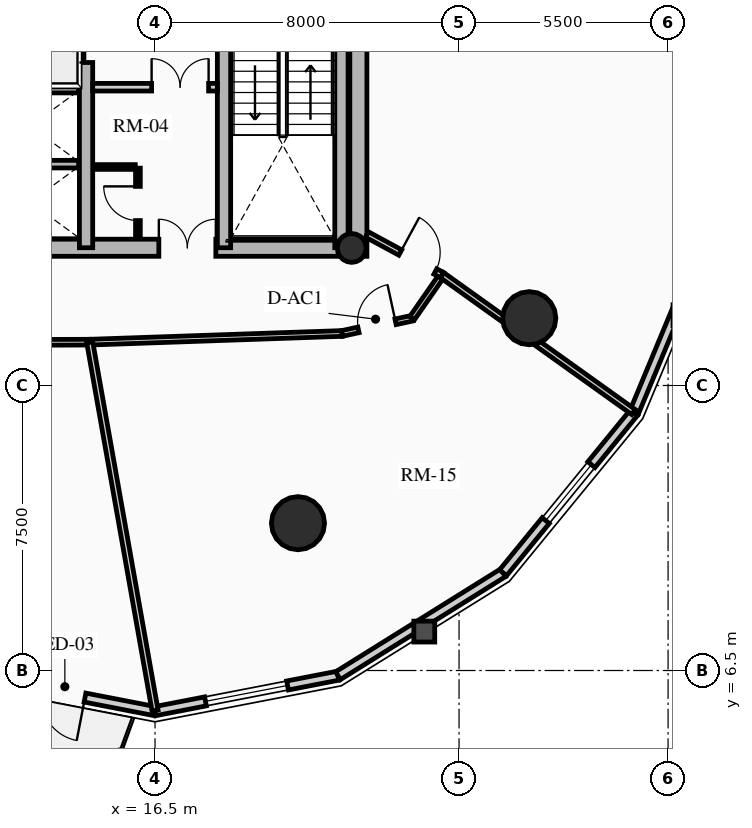
"""IFC4 building model, lengths in metres.
Left out: names, types, materials, properties, quantities, classifications, styles, units other than length and angle.
Written with IfcOpenShell. Run it as: python <this file> out.ifc"""

import sys

from ifc_helpers import new_model, si_unit, direction, frame, frame_2d, origin, origin_2d, place, context, subcontext, project, spatial, rectangle, circle, hollow_circle, extrude, source, transform, mapped, element, fill, save


model = new_model("IFC4")
c1 = context("Model", 3, precision=1e-05, world=origin(), true_north=direction((0.0, 1.0)))
c2 = subcontext(c1, "Body", "Model", "MODEL_VIEW")
j1 = project(units=[si_unit("LENGTHUNIT", "METRE"), si_unit("PLANEANGLEUNIT", "RADIAN")], contexts=[c1])
p1 = place(None, origin())
s1 = spatial("IfcSite", under=j1, at=p1, CompositionType="ELEMENT")
p2 = place(p1, origin())
s2 = spatial("IfcBuilding", under=s1, at=p2, CompositionType="ELEMENT")
p3 = place(p2, frame((0.0, 0.0, 113.8)))
s3 = spatial("IfcBuildingStorey", under=s2, at=p3, CompositionType="ELEMENT", Elevation=113.8)
p4 = place(p3, frame((21.85, 17.4, 0.0), z_axis=(0.0, 0.0, 1.0), x_axis=(0.0, 1.0, 0.0)))
e1 = element("IfcWall", 1, at=p4, inside=s3, PredefinedType="SHEAR", context=c2, shape_type="SweptSolid", body=[
    extrude(rectangle(XDim=14.2, YDim=0.45, at=frame_2d((7.1, 0.0))), origin(), (0.0, 0.0, 1.0), 2.91),
])
p5 = place(p3, frame((11.15, 17.625, 0.0), z_axis=(0.0, 0.0, 1.0), x_axis=(1.0, 0.0, 0.0)))
e2 = element("IfcWall", 2, at=p5, inside=s3, PredefinedType="SHEAR", context=c2, shape_type="SweptSolid", body=[
    extrude(rectangle(XDim=10.7, YDim=0.45, at=frame_2d((5.35, 0.0))), origin(), (0.0, 0.0, 1.0), 2.91),
])
m1 = source(origin(), c2, "Body", "SweptSolid", [
    extrude(rectangle(XDim=1.5, YDim=2.02, at=frame_2d((0.75, 1.01))), frame((0.0, 0.235, 0.0), z_axis=(0.0, -1.0, 0.0), x_axis=(1.0, 0.0, 0.0)), (0.0, 0.0, 1.0), 0.47),
])
p6 = place(p5, frame((5.45, 0.0, 0.0)))
e3 = element("IfcOpeningElement", 3, at=p6, cuts=e2, PredefinedType="OPENING", context=c2, shape_type="MappedRepresentation", body=[
    mapped(m1, transform((0.0, 0.0, 0.0), x_axis=(1.0, 0.0, 0.0), y_axis=(0.0, 1.0, 0.0), z_axis=(0.0, 0.0, 1.0), scale=1.0)),
])
p7 = place(p3, frame((14.685, 17.625, 0.0), z_axis=(0.0, 0.0, 1.0), x_axis=(0.0, 1.0, 0.0)))
e4 = element("IfcWall", 4, at=p7, inside=s3, PredefinedType="SHEAR", context=c2, shape_type="SweptSolid", body=[
    extrude(rectangle(XDim=13.75, YDim=0.35, at=frame_2d((6.875, 0.0))), origin(), (0.0, 0.0, 1.0), 2.91),
])
m2 = source(origin(), c2, "Body", "SweptSolid", [
    extrude(rectangle(XDim=1.1, YDim=2.015, at=frame_2d((0.55, 1.007))), frame((0.0, 0.185, 0.0), z_axis=(0.0, -1.0, 0.0), x_axis=(1.0, 0.0, 0.0)), (0.0, 0.0, 1.0), 0.37),
])
p8 = place(p7, frame((4.875, 0.0, 0.0)))
e5 = element("IfcOpeningElement", 5, at=p8, cuts=e4, PredefinedType="OPENING", context=c2, shape_type="MappedRepresentation", body=[
    mapped(m2, transform((0.0, 0.0, 0.0), x_axis=(1.0, 0.0, 0.0), y_axis=(0.0, 1.0, 0.0), z_axis=(0.0, 0.0, 1.0), scale=1.0)),
])
m3 = source(origin(), c2, "Body", "SweptSolid", [
    extrude(rectangle(XDim=1.15, YDim=2.02, at=frame_2d((0.575, 1.01))), frame((0.0, 0.185, 0.0), z_axis=(0.0, -1.0, 0.0), x_axis=(1.0, 0.0, 0.0)), (0.0, 0.0, 1.0), 0.37),
])
p9 = place(p7, frame((7.295, 0.0, 0.0)))
e6 = element("IfcOpeningElement", 6, at=p9, cuts=e4, PredefinedType="OPENING", context=c2, shape_type="MappedRepresentation", body=[
    mapped(m3, transform((0.0, 0.0, 0.0), x_axis=(1.0, 0.0, 0.0), y_axis=(0.0, 1.0, 0.0), z_axis=(0.0, 0.0, 1.0), scale=1.0)),
])
p10 = place(p3, frame((18.315, 17.625, 0.0), z_axis=(0.0, 0.0, 1.0), x_axis=(0.0, 1.0, 0.0)))
e7 = element("IfcWall", 7, at=p10, inside=s3, PredefinedType="SHEAR", context=c2, shape_type="SweptSolid", body=[
    extrude(rectangle(XDim=13.75, YDim=0.35, at=frame_2d((6.875, 0.0))), origin(), (0.0, 0.0, 1.0), 2.91),
])
p11 = place(p10, frame((10.0, 0.0, 0.0)))
e8 = element("IfcOpeningElement", 8, at=p11, cuts=e7, PredefinedType="OPENING", context=c2, shape_type="MappedRepresentation", body=[
    mapped(m2, transform((0.0, 0.0, 0.0), x_axis=(1.0, 0.0, 0.0), y_axis=(0.0, 1.0, 0.0), z_axis=(0.0, 0.0, 1.0), scale=1.0)),
])
p12 = place(p10, frame((12.0, 0.0, 0.0)))
e9 = element("IfcOpeningElement", 9, at=p12, cuts=e7, PredefinedType="OPENING", context=c2, shape_type="MappedRepresentation", body=[
    mapped(m2, transform((0.0, 0.0, 0.0), x_axis=(1.0, 0.0, 0.0), y_axis=(0.0, 1.0, 0.0), z_axis=(0.0, 0.0, 1.0), scale=1.0)),
])
p13 = place(p10, frame((5.305, 0.0, 0.0)))
e10 = element("IfcOpeningElement", 10, at=p13, cuts=e7, PredefinedType="OPENING", context=c2, shape_type="MappedRepresentation", body=[
    mapped(m3, transform((0.0, 0.0, 0.0), x_axis=(1.0, 0.0, 0.0), y_axis=(0.0, 1.0, 0.0), z_axis=(0.0, 0.0, 1.0), scale=1.0)),
])
p14 = place(p3, frame((21.405, 17.625, 0.0), z_axis=(0.0, 0.0, 1.0), x_axis=(0.0, 1.0, 0.0)))
e11 = element("IfcWall", 11, at=p14, inside=s3, PredefinedType="SHEAR", context=c2, shape_type="SweptSolid", body=[
    extrude(rectangle(XDim=6.72, YDim=0.35, at=frame_2d((3.36, 0.0))), origin(), (0.0, 0.0, 1.0), 2.91),
])
p15 = place(p3, frame((21.675, 17.62, 0.0), z_axis=(0.0, 0.0, 1.0), x_axis=(1.0, 0.0, 0.0)))
e12 = element("IfcColumn", 12, at=p15, inside=s3, PredefinedType="COLUMN", context=c2, shape_type="SweptSolid", body=[
    extrude(hollow_circle(Radius=0.38, WallThickness=0.032, at=origin_2d()), origin(), (0.0, 0.0, 1.0), 2.91),
])
for number, where, z_axis, x_axis in (
    (13, (20.261, 10.377, 0.0), (0.0, 0.0, 1.0), (1.0, 0.0, 0.0)),
    (14, (26.347, 15.771, 0.0), (0.0, 0.0, 1.0), (1.0, 0.0, 0.0)),
):
    element("IfcColumn", number, at=place(p3, frame(where, z_axis=z_axis, x_axis=x_axis)), inside=s3, PredefinedType="USERDEFINED", context=c2, shape_type="SweptSolid", body=[
        extrude(circle(Radius=0.7, at=origin_2d()), origin(), (0.0, 0.0, 1.0), 2.91),
    ])
p16 = place(p3, frame((16.5, 5.43, 0.0), z_axis=(0.0, 0.0, 1.0), x_axis=(-0.981723785992, 0.190311344954, 0.0)))
e15 = element("IfcWall", 15, at=p16, inside=s3, PredefinedType="SOLIDWALL", context=c2, shape_type="SweptSolid", body=[
    extrude(rectangle(XDim=4.904, YDim=0.24, at=frame_2d((2.452, 0.0))), origin(), (0.0, 0.0, 1.0), 2.179),
])
m4 = source(origin(), c2, "Body", "SweptSolid", [
    extrude(rectangle(XDim=1.15, YDim=2.005, at=frame_2d((0.575, 1.002))), frame((0.0, 0.13, 0.0), z_axis=(0.0, -1.0, 0.0), x_axis=(1.0, 0.0, 0.0)), (0.0, 0.0, 1.0), 0.26),
])
p17 = place(p16, frame((1.877, 0.0, 0.0)))
e16 = element("IfcOpeningElement", 16, at=p17, cuts=e15, PredefinedType="OPENING", context=c2, shape_type="MappedRepresentation", body=[
    mapped(m4, transform((0.0, 0.0, 0.0), x_axis=(1.0, 0.0, 0.0), y_axis=(0.0, 1.0, 0.0), z_axis=(0.0, 0.0, 1.0), scale=1.0)),
])
p18 = place(p3, frame((21.315, 6.363, 0.0), z_axis=(0.0, 0.0, 1.0), x_axis=(-0.981723785992, -0.190311344954, 0.0)))
e17 = element("IfcWall", 17, at=p18, inside=s3, PredefinedType="SOLIDWALL", context=c2, shape_type="SweptSolid", body=[
    extrude(rectangle(XDim=4.904, YDim=0.24, at=frame_2d((2.452, 0.0))), origin(), (0.0, 0.0, 1.0), 2.179),
])
m5 = source(origin(), c2, "Body", "SweptSolid", [
    extrude(rectangle(XDim=2.2, YDim=1.35, at=frame_2d((1.1, 0.675))), frame((0.0, 0.13, 0.0), z_axis=(0.0, -1.0, 0.0), x_axis=(1.0, 0.0, 0.0)), (0.0, 0.0, 1.0), 0.26),
])
p19 = place(p18, frame((1.352, 0.0, 0.65)))
e18 = element("IfcOpeningElement", 18, at=p19, cuts=e17, PredefinedType="OPENING", context=c2, shape_type="MappedRepresentation", body=[
    mapped(m5, transform((0.0, 0.0, 0.0), x_axis=(1.0, 0.0, 0.0), y_axis=(0.0, 1.0, 0.0), z_axis=(0.0, 0.0, 1.0), scale=1.0)),
])
p20 = place(p3, frame((25.658, 9.072, 0.0), z_axis=(0.0, 0.0, 1.0), x_axis=(-0.848520380187, -0.529162701263, 0.0)))
e19 = element("IfcWall", 19, at=p20, inside=s3, PredefinedType="SOLIDWALL", context=c2, shape_type="SweptSolid", body=[
    extrude(rectangle(XDim=5.119, YDim=0.24, at=frame_2d((2.56, 0.0))), origin(), (0.0, 0.0, 1.0), 2.179),
])
p21 = place(p3, frame((29.105, 13.291, 0.0), z_axis=(0.0, 0.0, 1.0), x_axis=(-0.632700781152, -0.77439635945, 0.0)))
e20 = element("IfcWall", 20, at=p21, inside=s3, PredefinedType="SOLIDWALL", context=c2, shape_type="SweptSolid", body=[
    extrude(rectangle(XDim=5.448, YDim=0.24, at=frame_2d((2.724, 0.0))), origin(), (0.0, 0.0, 1.0), 2.179),
])
m6 = source(origin(), c2, "Body", "SweptSolid", [
    extrude(rectangle(XDim=1.9, YDim=1.35, at=frame_2d((0.95, 0.675))), frame((0.0, 0.13, 0.0), z_axis=(0.0, -1.0, 0.0), x_axis=(1.0, 0.0, 0.0)), (0.0, 0.0, 1.0), 0.26),
])
p22 = place(p21, frame((1.774, 0.0, 0.65)))
e21 = element("IfcOpeningElement", 21, at=p22, cuts=e20, PredefinedType="OPENING", context=c2, shape_type="MappedRepresentation", body=[
    mapped(m6, transform((0.0, 0.0, 0.0), x_axis=(1.0, 0.0, 0.0), y_axis=(0.0, 1.0, 0.0), z_axis=(0.0, 0.0, 1.0), scale=1.0)),
])
p23 = place(p3, frame((31.318, 18.607, 0.0), z_axis=(0.0, 0.0, 1.0), x_axis=(-0.384344417632, -0.923189779317, 0.0)))
e22 = element("IfcWall", 22, at=p23, inside=s3, PredefinedType="SOLIDWALL", context=c2, shape_type="SweptSolid", body=[
    extrude(rectangle(XDim=5.758, YDim=0.24, at=frame_2d((2.879, 0.0))), origin(), (0.0, 0.0, 1.0), 2.179),
])
for number, where, z_axis, x_axis in (
    (23, (11.52, 21.8, 0.0), (0.0, 0.0, 1.0), (1.0, 0.0, 0.0)),
    (24, (11.52, 19.825, 0.0), (0.0, 0.0, 1.0), (1.0, 0.0, 0.0)),
):
    element("IfcWall", number, at=place(p3, frame(where, z_axis=z_axis, x_axis=x_axis)), inside=s3, PredefinedType="SHEAR", context=c2, shape_type="SweptSolid", body=[
        extrude(rectangle(XDim=2.97, YDim=0.2, at=frame_2d((1.485, 0.0))), origin(), (0.0, 0.0, 1.0), 2.91),
    ])
p24 = place(p3, frame((14.86, 21.85, 0.0), z_axis=(0.0, 0.0, 1.0), x_axis=(1.0, 0.0, 0.0)))
e25 = element("IfcWall", 25, at=p24, inside=s3, PredefinedType="PARTITIONING", context=c2, shape_type="SweptSolid", body=[
    extrude(rectangle(XDim=3.28, YDim=0.2, at=frame_2d((1.64, 0.0))), origin(), (0.0, 0.0, 1.0), 2.655),
])
m7 = source(origin(), c2, "Body", "SweptSolid", [
    extrude(rectangle(XDim=1.5, YDim=2.02, at=frame_2d((0.75, 1.01))), frame((0.0, 0.11, 0.0), z_axis=(0.0, -1.0, 0.0), x_axis=(1.0, 0.0, 0.0)), (0.0, 0.0, 1.0), 0.22),
])
p25 = place(p24, frame((1.55, 0.0, 0.0)))
e26 = element("IfcOpeningElement", 26, at=p25, cuts=e25, PredefinedType="OPENING", context=c2, shape_type="MappedRepresentation", body=[
    mapped(m7, transform((0.0, 0.0, 0.0), x_axis=(1.0, 0.0, 0.0), y_axis=(0.0, 1.0, 0.0), z_axis=(0.0, 0.0, 1.0), scale=1.0)),
])
p26 = place(p3, frame((16.05, 17.92, 0.0), z_axis=(0.0, 0.0, 1.0), x_axis=(0.0, 1.0, 0.0)))
e27 = element("IfcWall", 27, at=p26, inside=s3, PredefinedType="PARTITIONING", context=c2, shape_type="SweptSolid", body=[
    extrude(rectangle(XDim=1.8, YDim=0.125, at=frame_2d((0.9, 0.0))), origin(), (0.0, 0.0, 1.0), 2.655),
])
m8 = source(origin(), c2, "Body", "SweptSolid", [
    extrude(rectangle(XDim=0.9, YDim=2.005, at=frame_2d((0.45, 1.002))), frame((0.0, 0.073, 0.0), z_axis=(0.0, -1.0, 0.0), x_axis=(1.0, 0.0, 0.0)), (0.0, 0.0, 1.0), 0.145),
])
p27 = place(p26, frame((0.42, 0.0, 0.0)))
e28 = element("IfcOpeningElement", 28, at=p27, cuts=e27, PredefinedType="OPENING", context=c2, shape_type="MappedRepresentation", body=[
    mapped(m8, transform((0.0, 0.0, 0.0), x_axis=(1.0, 0.0, 0.0), y_axis=(0.0, 1.0, 0.0), z_axis=(0.0, 0.0, 1.0), scale=1.0)),
])
p28 = place(p3, frame((14.88, 19.75, 0.0), z_axis=(0.0, 0.0, 1.0), x_axis=(1.0, 0.0, 0.0)))
e29 = element("IfcWall", 29, at=p28, inside=s3, PredefinedType="PARTITIONING", context=c2, shape_type="SweptSolid", body=[
    extrude(rectangle(XDim=1.1, YDim=0.125, at=frame_2d((0.55, 0.0))), origin(), (0.0, 0.0, 1.0), 2.655),
])
p29 = place(p3, frame((11.46, 15.129, 0.0), z_axis=(0.0, 0.0, 1.0), x_axis=(0.999993513287, 0.003601858435, 0.0)))
e30 = element("IfcWall", 30, at=p29, inside=s3, PredefinedType="PARTITIONING", context=c2, shape_type="SweptSolid", body=[
    extrude(rectangle(XDim=3.321, YDim=0.15, at=frame_2d((1.661, 0.0))), origin(), (0.0, 0.0, 1.0), 2.225),
])
p30 = place(p3, frame((14.781, 15.141, 0.0), z_axis=(0.0, 0.0, 1.0), x_axis=(0.999407918707, 0.034406569513, 0.0)))
e31 = element("IfcWall", 31, at=p30, inside=s3, PredefinedType="PARTITIONING", context=c2, shape_type="SweptSolid", body=[
    extrude(rectangle(XDim=6.642, YDim=0.15, at=frame_2d((3.321, 0.0))), origin(), (0.0, 0.0, 1.0), 2.225),
])
p31 = place(p3, frame((21.419, 15.369, 0.0), z_axis=(0.0, 0.0, 1.0), x_axis=(0.977192701953, 0.212354475464, 0.0)))
e32 = element("IfcWall", 32, at=p31, inside=s3, PredefinedType="PARTITIONING", context=c2, shape_type="SweptSolid", body=[
    extrude(rectangle(XDim=1.888, YDim=0.15, at=frame_2d((0.944, 0.0))), origin(), (0.0, 0.0, 1.0), 2.225),
])
m9 = source(origin(), c2, "Body", "SweptSolid", [
    extrude(rectangle(XDim=1.0, YDim=2.015, at=frame_2d((0.5, 1.007))), frame((0.0, 0.085, 0.0), z_axis=(0.0, -1.0, 0.0), x_axis=(1.0, 0.0, 0.0)), (0.0, 0.0, 1.0), 0.17),
])
p32 = place(p31, frame((0.444, 0.0, 0.0)))
e33 = element("IfcOpeningElement", 33, at=p32, cuts=e32, PredefinedType="OPENING", context=c2, shape_type="MappedRepresentation", body=[
    mapped(m9, transform((0.0, 0.0, 0.0), x_axis=(1.0, 0.0, 0.0), y_axis=(0.0, 1.0, 0.0), z_axis=(0.0, 0.0, 1.0), scale=1.0)),
])
p33 = place(p3, frame((23.263, 15.77, 0.0), z_axis=(0.0, 0.0, 1.0), x_axis=(0.570743456919, 0.821128434768, 0.0)))
e34 = element("IfcWall", 34, at=p33, inside=s3, PredefinedType="PARTITIONING", context=c2, shape_type="SweptSolid", body=[
    extrude(rectangle(XDim=1.382, YDim=0.15, at=frame_2d((0.691, 0.0))), origin(), (0.0, 0.0, 1.0), 2.225),
])
p34 = place(p3, frame((14.781, 15.141, 0.0), z_axis=(0.0, 0.0, 1.0), x_axis=(0.174659805548, -0.984628839881, 0.0)))
e35 = element("IfcWall", 35, at=p34, inside=s3, PredefinedType="PARTITIONING", context=c2, shape_type="SweptSolid", body=[
    extrude(rectangle(XDim=9.842, YDim=0.16, at=frame_2d((4.921, 0.0))), origin(), (0.0, 0.0, 1.0), 2.179),
])
p35 = place(p3, frame((24.052, 16.905, 0.0), z_axis=(0.0, 0.0, 1.0), x_axis=(0.813437670746, -0.581652091727, 0.0)))
e36 = element("IfcWall", 36, at=p35, inside=s3, PredefinedType="PARTITIONING", context=c2, shape_type="SweptSolid", body=[
    extrude(rectangle(XDim=6.192, YDim=0.16, at=frame_2d((3.096, 0.0))), origin(), (0.0, 0.0, 1.0), 2.179),
])
p36 = place(p3, frame((22.075, 17.975, 0.0), z_axis=(0.0, 0.0, 1.0), x_axis=(0.879356383302, -0.476164206073, 0.0)))
e37 = element("IfcWall", 37, at=p36, inside=s3, PredefinedType="PARTITIONING", context=c2, shape_type="SweptSolid", body=[
    extrude(rectangle(XDim=2.248, YDim=0.16, at=frame_2d((1.124, 0.0))), origin(), (0.0, 0.0, 1.0), 2.225),
])
m10 = source(origin(), c2, "Body", "SweptSolid", [
    extrude(rectangle(XDim=1.05, YDim=2.015, at=frame_2d((0.525, 1.007))), frame((0.0, 0.09, 0.0), z_axis=(0.0, -1.0, 0.0), x_axis=(1.0, 0.0, 0.0)), (0.0, 0.0, 1.0), 0.18),
])
p37 = place(p36, frame((0.998, 0.0, 0.0)))
e38 = element("IfcOpeningElement", 38, at=p37, cuts=e37, PredefinedType="OPENING", context=c2, shape_type="MappedRepresentation", body=[
    mapped(m10, transform((0.0, 0.0, 0.0), x_axis=(1.0, 0.0, 0.0), y_axis=(0.0, 1.0, 0.0), z_axis=(0.0, 0.0, 1.0), scale=1.0)),
])
m11 = source(origin(), c2, "Body", "SweptSolid", [
    extrude(rectangle(XDim=1.15, YDim=2.005, at=frame_2d((0.575, 1.002))), frame((0.0, 0.025, 0.0), z_axis=(0.0, -1.0, 0.0), x_axis=(1.0, 0.0, 0.0)), (0.0, 0.0, 1.0), 0.05),
])
p38 = place(p17, origin())
e39 = element("IfcDoor", 39, at=p38, inside=s3, OperationType="SINGLE_SWING_LEFT", PredefinedType="DOOR", context=c2, shape_type="MappedRepresentation", body=[
    mapped(m11, transform((0.0, 0.0, 0.0), x_axis=(1.0, 0.0, 0.0), y_axis=(0.0, 1.0, 0.0), z_axis=(0.0, 0.0, 1.0), scale=1.0)),
])
fill(e16, e39)
m12 = source(origin(), c2, "Body", "SweptSolid", [
    extrude(rectangle(XDim=2.2, YDim=1.35, at=frame_2d((1.1, 0.675))), frame((0.0, 0.03, 0.0), z_axis=(0.0, -1.0, 0.0), x_axis=(1.0, 0.0, 0.0)), (0.0, 0.0, 1.0), 0.06),
])
p39 = place(p19, origin())
e40 = element("IfcWindow", 40, at=p39, inside=s3, PartitioningType="DOUBLE_PANEL_VERTICAL", PredefinedType="WINDOW", context=c2, shape_type="MappedRepresentation", body=[
    mapped(m12, transform((0.0, 0.0, 0.0), x_axis=(1.0, 0.0, 0.0), y_axis=(0.0, 1.0, 0.0), z_axis=(0.0, 0.0, 1.0), scale=1.0)),
])
fill(e18, e40)
m13 = source(origin(), c2, "Body", "SweptSolid", [
    extrude(rectangle(XDim=1.9, YDim=1.35, at=frame_2d((0.95, 0.675))), frame((0.0, 0.03, 0.0), z_axis=(0.0, -1.0, 0.0), x_axis=(1.0, 0.0, 0.0)), (0.0, 0.0, 1.0), 0.06),
])
p40 = place(p22, origin())
e41 = element("IfcWindow", 41, at=p40, inside=s3, PartitioningType="DOUBLE_PANEL_VERTICAL", PredefinedType="WINDOW", context=c2, shape_type="MappedRepresentation", body=[
    mapped(m13, transform((0.0, 0.0, 0.0), x_axis=(1.0, 0.0, 0.0), y_axis=(0.0, 1.0, 0.0), z_axis=(0.0, 0.0, 1.0), scale=1.0)),
])
fill(e21, e41)
m14 = source(origin(), c2, "Body", "SweptSolid", [
    extrude(rectangle(XDim=1.1, YDim=2.015, at=frame_2d((0.55, 1.007))), frame((0.0, 0.025, 0.0), z_axis=(0.0, -1.0, 0.0), x_axis=(1.0, 0.0, 0.0)), (0.0, 0.0, 1.0), 0.05),
])
p41 = place(p8, origin())
e42 = element("IfcDoor", 42, at=p41, inside=s3, OperationType="SLIDING_TO_LEFT", PredefinedType="DOOR", context=c2, shape_type="MappedRepresentation", body=[
    mapped(m14, transform((0.0, 0.0, 0.0), x_axis=(1.0, 0.0, 0.0), y_axis=(0.0, 1.0, 0.0), z_axis=(0.0, 0.0, 1.0), scale=1.0)),
])
fill(e5, e42)
m15 = source(origin(), c2, "Body", "SweptSolid", [
    extrude(rectangle(XDim=1.5, YDim=2.02, at=frame_2d((0.75, 1.01))), frame((0.0, 0.025, 0.0), z_axis=(0.0, -1.0, 0.0), x_axis=(1.0, 0.0, 0.0)), (0.0, 0.0, 1.0), 0.05),
])
p42 = place(p6, origin())
e43 = element("IfcDoor", 43, at=p42, inside=s3, OperationType="DOUBLE_DOOR_SINGLE_SWING", PredefinedType="DOOR", context=c2, shape_type="MappedRepresentation", body=[
    mapped(m15, transform((0.0, 0.0, 0.0), x_axis=(1.0, 0.0, 0.0), y_axis=(0.0, 1.0, 0.0), z_axis=(0.0, 0.0, 1.0), scale=1.0)),
])
fill(e3, e43)
p43 = place(p25, origin())
e44 = element("IfcDoor", 44, at=p43, inside=s3, OperationType="DOUBLE_DOOR_SINGLE_SWING", PredefinedType="DOOR", context=c2, shape_type="MappedRepresentation", body=[
    mapped(m15, transform((0.0, 0.0, 0.0), x_axis=(1.0, 0.0, 0.0), y_axis=(0.0, 1.0, 0.0), z_axis=(0.0, 0.0, 1.0), scale=1.0)),
])
fill(e26, e44)
m16 = source(origin(), c2, "Body", "SweptSolid", [
    extrude(rectangle(XDim=0.9, YDim=2.005, at=frame_2d((0.45, 1.002))), frame((0.0, 0.025, 0.0), z_axis=(0.0, -1.0, 0.0), x_axis=(1.0, 0.0, 0.0)), (0.0, 0.0, 1.0), 0.05),
])
p44 = place(p27, origin())
e45 = element("IfcDoor", 45, at=p44, inside=s3, OperationType="SINGLE_SWING_RIGHT", PredefinedType="DOOR", context=c2, shape_type="MappedRepresentation", body=[
    mapped(m16, transform((0.0, 0.0, 0.0), x_axis=(1.0, 0.0, 0.0), y_axis=(0.0, 1.0, 0.0), z_axis=(0.0, 0.0, 1.0), scale=1.0)),
])
fill(e28, e45)
m17 = source(origin(), c2, "Body", "SweptSolid", [
    extrude(rectangle(XDim=1.05, YDim=2.015, at=frame_2d((0.525, 1.007))), frame((0.0, 0.025, 0.0), z_axis=(0.0, -1.0, 0.0), x_axis=(1.0, 0.0, 0.0)), (0.0, 0.0, 1.0), 0.05),
])
p45 = place(p37, origin())
e46 = element("IfcDoor", 46, at=p45, inside=s3, OperationType="SINGLE_SWING_LEFT", PredefinedType="DOOR", context=c2, shape_type="MappedRepresentation", body=[
    mapped(m17, transform((0.0, 0.0, 0.0), x_axis=(1.0, 0.0, 0.0), y_axis=(0.0, 1.0, 0.0), z_axis=(0.0, 0.0, 1.0), scale=1.0)),
])
fill(e38, e46)
m18 = source(origin(), c2, "Body", "SweptSolid", [
    extrude(rectangle(XDim=1.0, YDim=2.015, at=frame_2d((0.5, 1.007))), frame((0.0, 0.025, 0.0), z_axis=(0.0, -1.0, 0.0), x_axis=(1.0, 0.0, 0.0)), (0.0, 0.0, 1.0), 0.05),
])
p46 = place(p32, origin())
e47 = element("IfcDoor", 47, at=p46, inside=s3, OperationType="SINGLE_SWING_RIGHT", PredefinedType="DOOR", context=c2, shape_type="MappedRepresentation", body=[
    mapped(m18, transform((0.0, 0.0, 0.0), x_axis=(1.0, 0.0, 0.0), y_axis=(0.0, 1.0, 0.0), z_axis=(0.0, 0.0, 1.0), scale=1.0)),
])
fill(e33, e47)
save(model, sys.argv[1])
